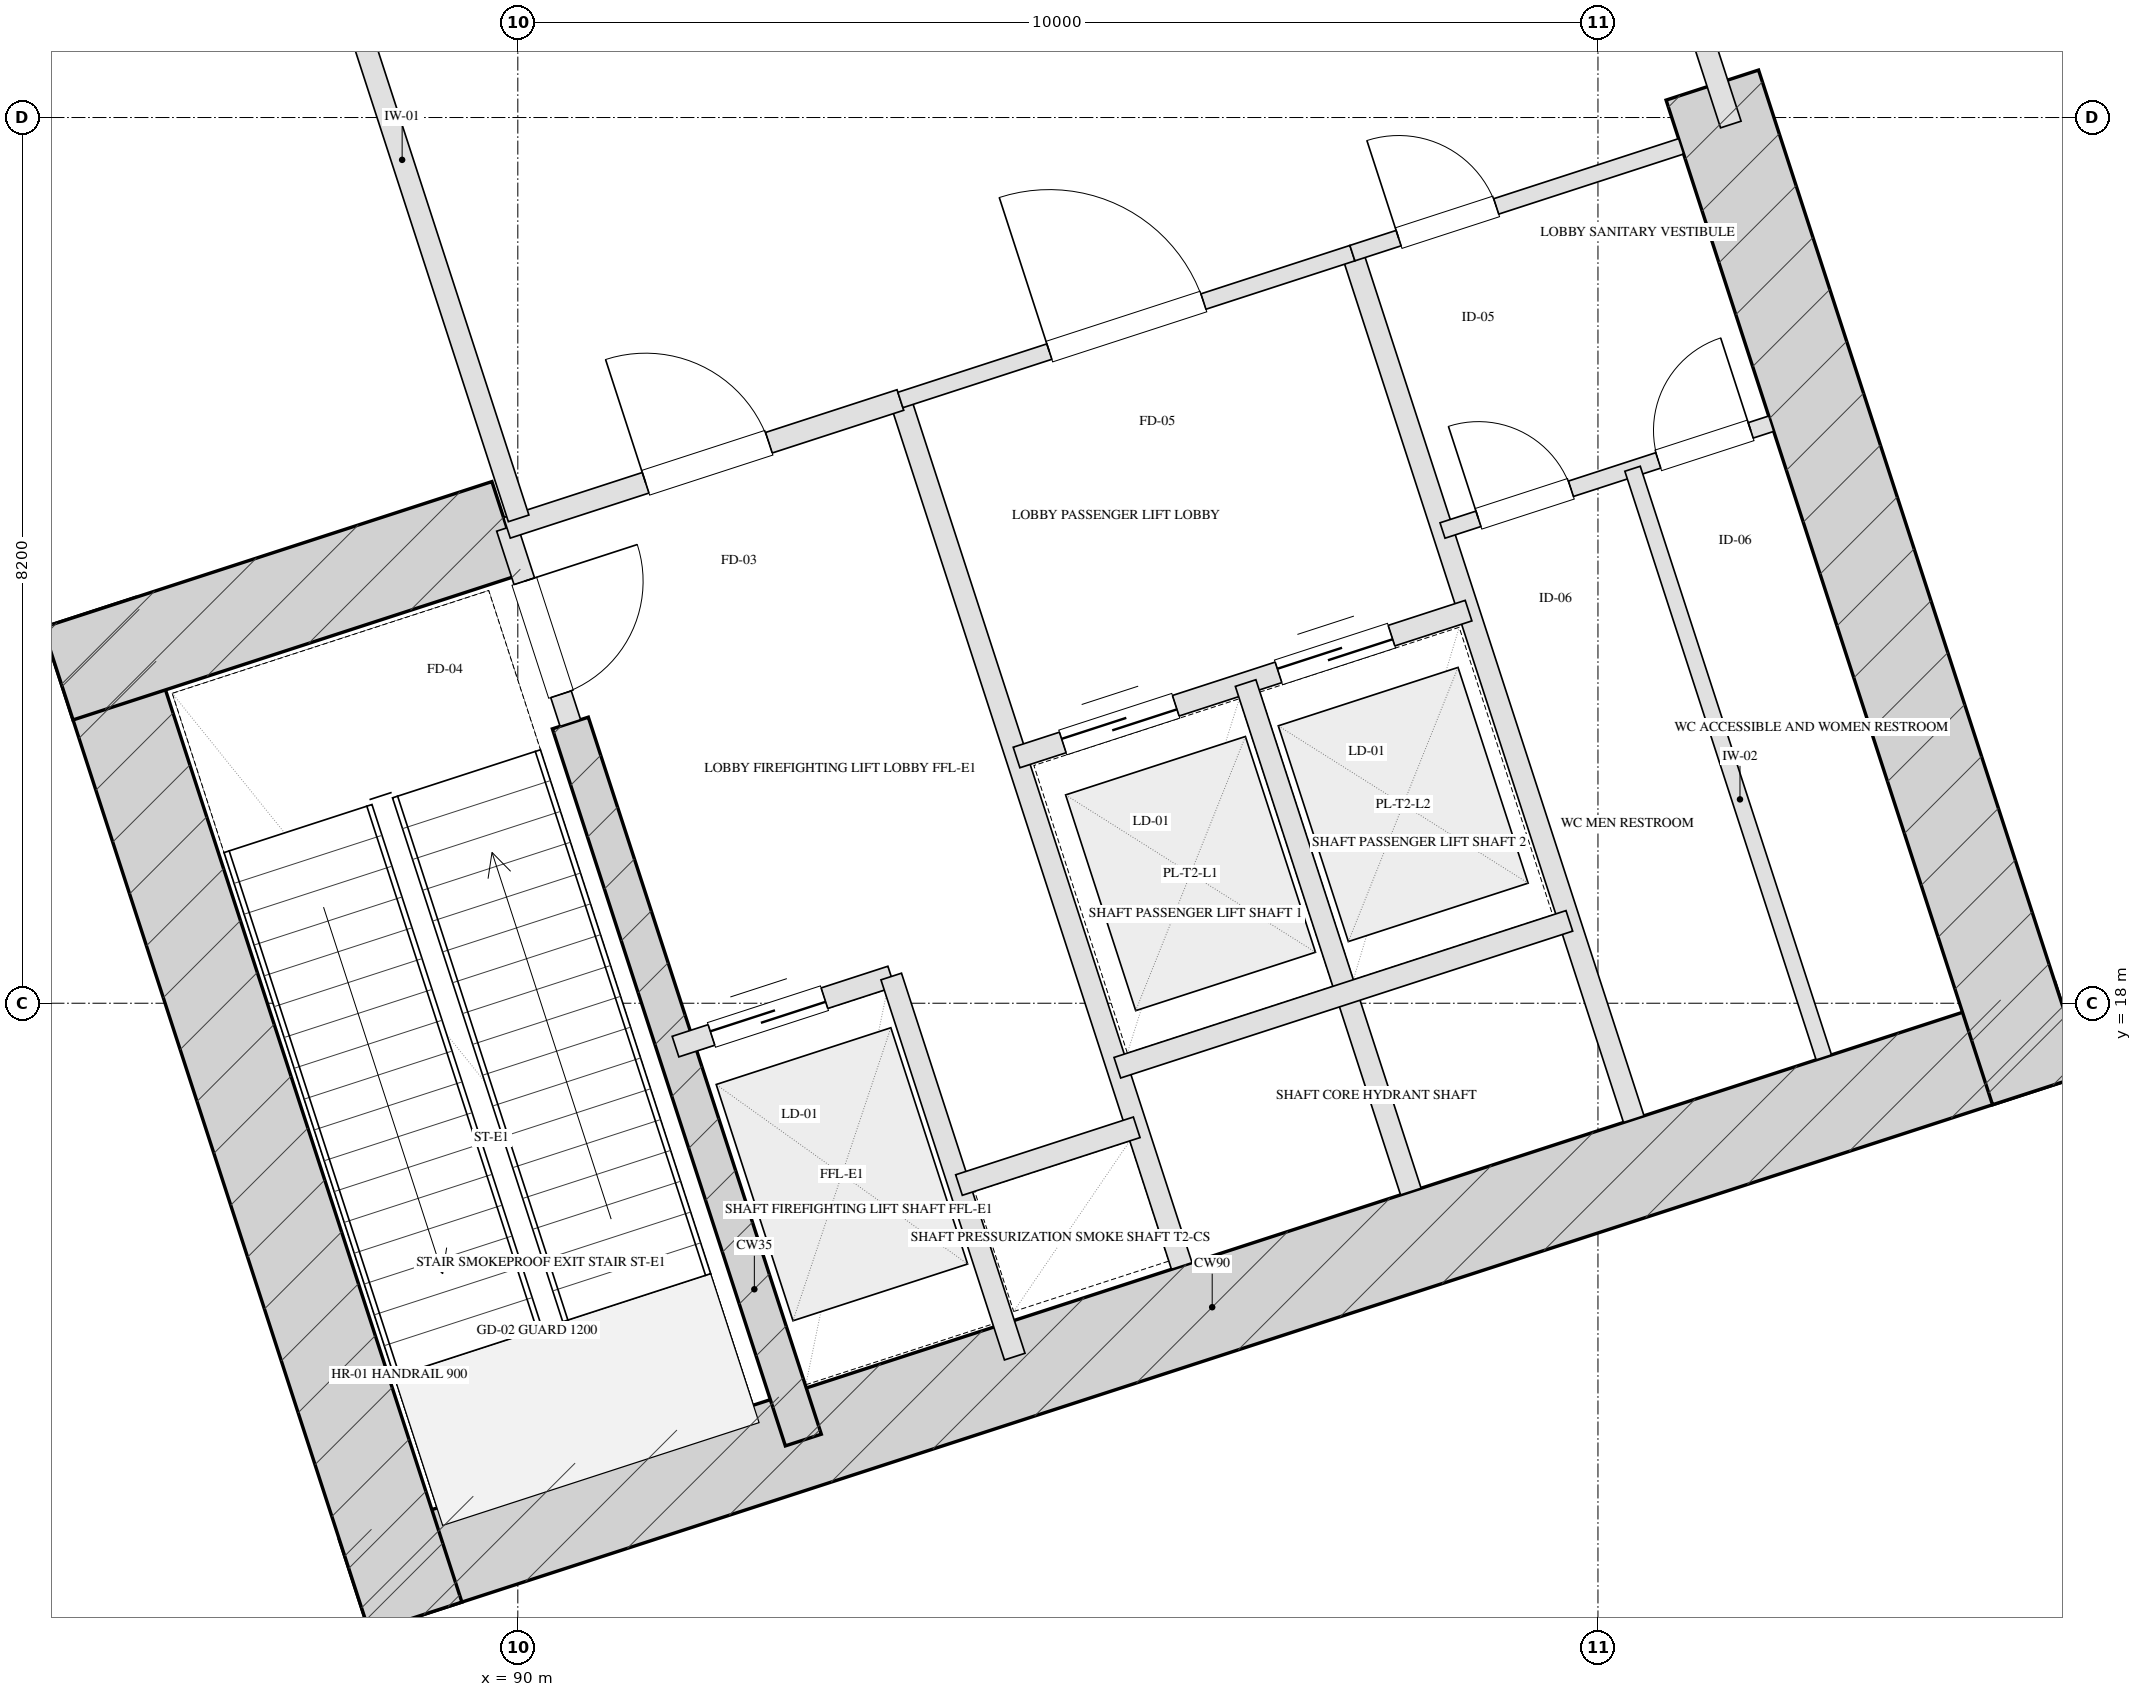
"""IFC4 building model, lengths in metres.
Left out: names, types, materials, properties, quantities, classifications, styles, units other than length and angle.
Written with IfcOpenShell. Run it as: python <this file> out.ifc"""

import sys

from ifc_helpers import new_model, si_unit, direction, frame, frame_2d, origin, place, context, subcontext, project, spatial, rectangle, extrude, element, fill, save


model = new_model("IFC4")
c1 = context("Model", 3, precision=1e-05, world=origin(), true_north=direction((0.0, 1.0)))
c2 = subcontext(c1, "Body", "Model", "MODEL_VIEW")
j1 = project(units=[si_unit("LENGTHUNIT", "METRE"), si_unit("PLANEANGLEUNIT", "RADIAN")], contexts=[c1])
p1 = place(None, origin())
s1 = spatial("IfcSite", under=j1, at=p1, CompositionType="ELEMENT")
p2 = place(p1, origin())
s2 = spatial("IfcBuilding", under=s1, at=p2, CompositionType="ELEMENT")
p3 = place(p2, origin())
s3 = spatial("IfcBuildingStorey", under=s2, at=p3, CompositionType="ELEMENT", Elevation=0.0)
p4 = place(p3, frame((88.487, 12.605, 0.0), z_axis=(0.0, 0.0, 1.0), x_axis=(0.951055016115, 0.309021611416, 0.0)))
e1 = element("IfcWall", 1, at=p4, inside=s3, PredefinedType="SHEAR", context=c2, shape_type="SweptSolid", body=[
    extrude(rectangle(XDim=16.7, YDim=0.9, at=frame_2d((8.35, 0.0))), origin(), (0.0, 0.0, 1.0), 6.0),
])
p5 = place(p3, frame((86.032, 21.618, 0.0), z_axis=(0.0, 0.0, 1.0), x_axis=(0.30901438634, -0.951057363693, 0.0)))
e2 = element("IfcWall", 2, at=p5, inside=s3, PredefinedType="SHEAR", context=c2, shape_type="SweptSolid", body=[
    extrude(rectangle(XDim=9.78, YDim=0.9, at=frame_2d((4.89, 0.0))), origin(), (0.0, 0.0, 1.0), 6.0),
])
p6 = place(p3, frame((101.059, 26.5, 0.0), z_axis=(0.0, 0.0, 1.0), x_axis=(0.309021722829, -0.951054979914, 0.0)))
e3 = element("IfcWall", 3, at=p6, inside=s3, PredefinedType="SHEAR", context=c2, shape_type="SweptSolid", body=[
    extrude(rectangle(XDim=9.78, YDim=0.9, at=frame_2d((4.89, 0.0))), origin(), (0.0, 0.0, 1.0), 6.0),
])
p7 = place(p3, frame((90.486, 20.594, 0.0), z_axis=(0.0, 0.0, 1.0), x_axis=(0.309020428229, -0.951055400562, 0.0)))
e4 = element("IfcWall", 4, at=p7, inside=s3, PredefinedType="SHEAR", context=c2, shape_type="SweptSolid", body=[
    extrude(rectangle(XDim=6.98, YDim=0.35, at=frame_2d((3.49, 0.0))), origin(), (0.0, 0.0, 1.0), 6.0),
])
p8 = place(p3, frame((85.743, 21.051, 0.0), z_axis=(0.0, 0.0, 1.0), x_axis=(0.951063623806, 0.308995118848, 0.0)))
e5 = element("IfcWall", 5, at=p8, inside=s3, PredefinedType="SHEAR", context=c2, shape_type="SweptSolid", body=[
    extrude(rectangle(XDim=4.37, YDim=0.9, at=frame_2d((2.185, 0.0))), origin(), (0.0, 0.0, 1.0), 6.0),
])
p9 = place(p3, frame((89.899, 22.401, 0.0), z_axis=(0.0, 0.0, 1.0), x_axis=(0.308932062672, -0.951084108086, 0.0)))
e6 = element("IfcWall", 6, at=p9, inside=s3, PredefinedType="PARTITIONING", context=c2, shape_type="SweptSolid", body=[
    extrude(rectangle(XDim=1.9, YDim=0.2, at=frame_2d((0.95, 0.0))), origin(), (0.0, 0.0, 1.0), 5.685),
])
p10 = place(p9, frame((0.52, 0.0, 0.0)))
e7 = element("IfcOpeningElement", 7, at=p10, cuts=e6, PredefinedType="OPENING", context=c2, shape_type="SweptSolid", body=[
    extrude(rectangle(XDim=1.1, YDim=2.05, at=frame_2d((0.55, 1.025))), frame((0.0, 0.11, 0.0), z_axis=(0.0, -1.0, 0.0), x_axis=(1.0, 0.0, 0.0)), (0.0, 0.0, 1.0), 0.22),
])
p11 = place(p3, frame((93.542, 23.585, 0.0), z_axis=(0.0, 0.0, 1.0), x_axis=(0.309042196757, -0.951048327176, 0.0)))
e8 = element("IfcWall", 8, at=p11, inside=s3, PredefinedType="PARTITIONING", context=c2, shape_type="SweptSolid", body=[
    extrude(rectangle(XDim=8.43, YDim=0.2, at=frame_2d((4.215, 0.0))), origin(), (0.0, 0.0, 1.0), 5.685),
])
p12 = place(p3, frame((89.899, 22.401, 0.0), z_axis=(0.0, 0.0, 1.0), x_axis=(0.951046716504, 0.309047153403, 0.0)))
e9 = element("IfcWall", 9, at=p12, inside=s3, PredefinedType="PARTITIONING", context=c2, shape_type="SweptSolid", body=[
    extrude(rectangle(XDim=3.83, YDim=0.2, at=frame_2d((1.915, 0.0))), origin(), (0.0, 0.0, 1.0), 5.685),
])
p13 = place(p12, frame((1.35, 0.0, 0.0)))
e10 = element("IfcOpeningElement", 10, at=p13, cuts=e9, PredefinedType="OPENING", context=c2, shape_type="SweptSolid", body=[
    extrude(rectangle(XDim=1.2, YDim=2.05, at=frame_2d((0.6, 1.025))), frame((0.0, 0.11, 0.0), z_axis=(0.0, -1.0, 0.0), x_axis=(1.0, 0.0, 0.0)), (0.0, 0.0, 1.0), 0.22),
])
p14 = place(p3, frame((91.46, 17.598, 0.0), z_axis=(0.0, 0.0, 1.0), x_axis=(0.951062257173, 0.308999325213, 0.0)))
e11 = element("IfcWall", 11, at=p14, inside=s3, PredefinedType="PARTITIONING", context=c2, shape_type="SweptSolid", body=[
    extrude(rectangle(XDim=2.1, YDim=0.2, at=frame_2d((1.05, 0.0))), origin(), (0.0, 0.0, 1.0), 5.685),
])
p15 = place(p14, frame((0.35, 0.0, 0.0)))
e12 = element("IfcOpeningElement", 12, at=p15, cuts=e11, PredefinedType="OPENING", context=c2, shape_type="SweptSolid", body=[
    extrude(rectangle(XDim=1.1, YDim=2.05, at=frame_2d((0.55, 1.025))), frame((0.0, 0.11, 0.0), z_axis=(0.0, -1.0, 0.0), x_axis=(1.0, 0.0, 0.0)), (0.0, 0.0, 1.0), 0.22),
])
p16 = place(p3, frame((93.457, 18.247, 0.0), z_axis=(0.0, 0.0, 1.0), x_axis=(0.3089935693, -0.951064127245, 0.0)))
e13 = element("IfcWall", 13, at=p16, inside=s3, PredefinedType="PARTITIONING", context=c2, shape_type="SweptSolid", body=[
    extrude(rectangle(XDim=3.7, YDim=0.2, at=frame_2d((1.85, 0.0))), origin(), (0.0, 0.0, 1.0), 5.685),
])
p17 = place(p3, frame((94.084, 16.317, 0.0), z_axis=(0.0, 0.0, 1.0), x_axis=(0.951041328149, 0.309063734775, 0.0)))
e14 = element("IfcWall", 14, at=p17, inside=s3, PredefinedType="PARTITIONING", context=c2, shape_type="SweptSolid", body=[
    extrude(rectangle(XDim=1.73, YDim=0.2, at=frame_2d((0.865, 0.0))), origin(), (0.0, 0.0, 1.0), 5.685),
])
p18 = place(p3, frame((97.727, 24.944, 0.0), z_axis=(0.0, 0.0, 1.0), x_axis=(0.309016001439, -0.951056838919, 0.0)))
e15 = element("IfcWall", 15, at=p18, inside=s3, PredefinedType="PARTITIONING", context=c2, shape_type="SweptSolid", body=[
    extrude(rectangle(XDim=8.43, YDim=0.2, at=frame_2d((4.215, 0.0))), origin(), (0.0, 0.0, 1.0), 5.685),
])
p19 = place(p3, frame((93.542, 23.585, 0.0), z_axis=(0.0, 0.0, 1.0), x_axis=(0.951063829732, 0.308994485023, 0.0)))
e16 = element("IfcWall", 16, at=p19, inside=s3, PredefinedType="PARTITIONING", context=c2, shape_type="SweptSolid", body=[
    extrude(rectangle(XDim=4.4, YDim=0.15, at=frame_2d((2.2, 0.0))), origin(), (0.0, 0.0, 1.0), 5.685),
])
p20 = place(p19, frame((1.45, 0.0, 0.0)))
e17 = element("IfcOpeningElement", 17, at=p20, cuts=e16, PredefinedType="OPENING", context=c2, shape_type="SweptSolid", body=[
    extrude(rectangle(XDim=1.5, YDim=2.05, at=frame_2d((0.75, 1.025))), frame((0.0, 0.085, 0.0), z_axis=(0.0, -1.0, 0.0), x_axis=(1.0, 0.0, 0.0)), (0.0, 0.0, 1.0), 0.17),
])
p21 = place(p3, frame((94.617, 20.275, 0.0), z_axis=(0.0, 0.0, 1.0), x_axis=(0.951058531764, 0.30901079133, 0.0)))
e18 = element("IfcWall", 18, at=p21, inside=s3, PredefinedType="PARTITIONING", context=c2, shape_type="SweptSolid", body=[
    extrude(rectangle(XDim=4.4, YDim=0.2, at=frame_2d((2.2, 0.0))), origin(), (0.0, 0.0, 1.0), 5.685),
])
p22 = place(p21, frame((0.45, 0.0, 0.0)))
e19 = element("IfcOpeningElement", 19, at=p22, cuts=e18, PredefinedType="OPENING", context=c2, shape_type="SweptSolid", body=[
    extrude(rectangle(XDim=1.1, YDim=2.05, at=frame_2d((0.55, 1.025))), frame((0.0, 0.11, 0.0), z_axis=(0.0, -1.0, 0.0), x_axis=(1.0, 0.0, 0.0)), (0.0, 0.0, 1.0), 0.22),
])
p23 = place(p21, frame((2.55, 0.0, 0.0)))
e20 = element("IfcOpeningElement", 20, at=p23, cuts=e18, PredefinedType="OPENING", context=c2, shape_type="SweptSolid", body=[
    extrude(rectangle(XDim=1.1, YDim=2.05, at=frame_2d((0.55, 1.025))), frame((0.0, 0.11, 0.0), z_axis=(0.0, -1.0, 0.0), x_axis=(1.0, 0.0, 0.0)), (0.0, 0.0, 1.0), 0.22),
])
p24 = place(p3, frame((96.738, 20.964, 0.0), z_axis=(0.0, 0.0, 1.0), x_axis=(0.309042578481, -0.951048203135, 0.0)))
e21 = element("IfcWall", 21, at=p24, inside=s3, PredefinedType="PARTITIONING", context=c2, shape_type="SweptSolid", body=[
    extrude(rectangle(XDim=4.95, YDim=0.2, at=frame_2d((2.475, 0.0))), origin(), (0.0, 0.0, 1.0), 5.685),
])
p25 = place(p3, frame((95.551, 17.403, 0.0), z_axis=(0.0, 0.0, 1.0), x_axis=(0.951058531764, 0.30901079133, 0.0)))
e22 = element("IfcWall", 22, at=p25, inside=s3, PredefinedType="PARTITIONING", context=c2, shape_type="SweptSolid", body=[
    extrude(rectangle(XDim=4.4, YDim=0.2, at=frame_2d((2.2, 0.0))), origin(), (0.0, 0.0, 1.0), 5.685),
])
p26 = place(p3, frame((97.727, 24.944, 0.0), z_axis=(0.0, 0.0, 1.0), x_axis=(0.951036872128, 0.309077446369, 0.0)))
e23 = element("IfcWall", 23, at=p26, inside=s3, PredefinedType="PARTITIONING", context=c2, shape_type="SweptSolid", body=[
    extrude(rectangle(XDim=3.2, YDim=0.15, at=frame_2d((1.6, 0.0))), origin(), (0.0, 0.0, 1.0), 5.685),
])
p27 = place(p26, frame((0.45, 0.0, 0.0)))
e24 = element("IfcOpeningElement", 24, at=p27, cuts=e23, PredefinedType="OPENING", context=c2, shape_type="SweptSolid", body=[
    extrude(rectangle(XDim=0.95, YDim=2.05, at=frame_2d((0.475, 1.025))), frame((0.0, 0.085, 0.0), z_axis=(0.0, -1.0, 0.0), x_axis=(1.0, 0.0, 0.0)), (0.0, 0.0, 1.0), 0.17),
])
p28 = place(p3, frame((98.561, 22.376, 0.0), z_axis=(0.0, 0.0, 1.0), x_axis=(0.95104415986, 0.309055020985, 0.0)))
e25 = element("IfcWall", 25, at=p28, inside=s3, PredefinedType="PARTITIONING", context=c2, shape_type="SweptSolid", body=[
    extrude(rectangle(XDim=3.2, YDim=0.15, at=frame_2d((1.6, 0.0))), origin(), (0.0, 0.0, 1.0), 5.685),
])
p29 = place(p28, frame((0.35, 0.0, 0.0)))
e26 = element("IfcOpeningElement", 26, at=p29, cuts=e25, PredefinedType="OPENING", context=c2, shape_type="SweptSolid", body=[
    extrude(rectangle(XDim=0.9, YDim=2.05, at=frame_2d((0.45, 1.025))), frame((0.0, 0.085, 0.0), z_axis=(0.0, -1.0, 0.0), x_axis=(1.0, 0.0, 0.0)), (0.0, 0.0, 1.0), 0.17),
])
p30 = place(p28, frame((2.1, 0.0, 0.0)))
e27 = element("IfcOpeningElement", 27, at=p30, cuts=e25, PredefinedType="OPENING", context=c2, shape_type="SweptSolid", body=[
    extrude(rectangle(XDim=0.9, YDim=2.05, at=frame_2d((0.45, 1.025))), frame((0.0, 0.085, 0.0), z_axis=(0.0, -1.0, 0.0), x_axis=(1.0, 0.0, 0.0)), (0.0, 0.0, 1.0), 0.17),
])
p31 = place(p3, frame((100.32, 22.948, 0.0), z_axis=(0.0, 0.0, 1.0), x_axis=(0.309035009867, -0.951050662518, 0.0)))
e28 = element("IfcWall", 28, at=p31, inside=s3, PredefinedType="PARTITIONING", context=c2, shape_type="SweptSolid", body=[
    extrude(rectangle(XDim=5.73, YDim=0.15, at=frame_2d((2.865, 0.0))), origin(), (0.0, 0.0, 1.0), 5.685),
])
p32 = place(p3, frame((90.008, 22.489, 0.0), z_axis=(0.0, 0.0, 1.0), x_axis=(-0.309023559774, 0.951054383043, 0.0)))
e29 = element("IfcWall", 29, at=p32, inside=s3, PredefinedType="PARTITIONING", context=c2, shape_type="SweptSolid", body=[
    extrude(rectangle(XDim=6.8, YDim=0.2, at=frame_2d((3.4, 0.0))), origin(), (0.0, 0.0, 1.0), 5.685),
])
p33 = place(p3, frame((101.23, 26.135, 0.0), z_axis=(0.0, 0.0, 1.0), x_axis=(-0.30903760131, 0.951049820449, 0.0)))
e30 = element("IfcWall", 30, at=p33, inside=s3, PredefinedType="PARTITIONING", context=c2, shape_type="SweptSolid", body=[
    extrude(rectangle(XDim=4.1, YDim=0.2, at=frame_2d((2.05, 0.0))), origin(), (0.0, 0.0, 1.0), 5.685),
])
p34 = place(p10, origin())
e31 = element("IfcDoor", 31, at=p34, inside=s3, OperationType="SINGLE_SWING_LEFT", PredefinedType="DOOR", context=c2, shape_type="SweptSolid", body=[
    extrude(rectangle(XDim=1.1, YDim=2.05, at=frame_2d((0.55, 1.025))), frame((0.0, 0.025, 0.0), z_axis=(0.0, -1.0, 0.0), x_axis=(1.0, 0.0, 0.0)), (0.0, 0.0, 1.0), 0.05),
])
fill(e7, e31)
p35 = place(p13, origin())
e32 = element("IfcDoor", 32, at=p35, inside=s3, OperationType="SINGLE_SWING_LEFT", PredefinedType="DOOR", context=c2, shape_type="SweptSolid", body=[
    extrude(rectangle(XDim=1.2, YDim=2.05, at=frame_2d((0.6, 1.025))), frame((0.0, 0.025, 0.0), z_axis=(0.0, -1.0, 0.0), x_axis=(1.0, 0.0, 0.0)), (0.0, 0.0, 1.0), 0.05),
])
fill(e10, e32)
p36 = place(p15, origin())
e33 = element("IfcDoor", 33, at=p36, inside=s3, OperationType="DOUBLE_DOOR_SLIDING", PredefinedType="DOOR", context=c2, shape_type="SweptSolid", body=[
    extrude(rectangle(XDim=1.1, YDim=2.05, at=frame_2d((0.55, 1.025))), frame((0.0, 0.025, 0.0), z_axis=(0.0, -1.0, 0.0), x_axis=(1.0, 0.0, 0.0)), (0.0, 0.0, 1.0), 0.05),
])
fill(e12, e33)
p37 = place(p20, origin())
e34 = element("IfcDoor", 34, at=p37, inside=s3, OperationType="SINGLE_SWING_LEFT", PredefinedType="DOOR", context=c2, shape_type="SweptSolid", body=[
    extrude(rectangle(XDim=1.5, YDim=2.05, at=frame_2d((0.75, 1.025))), frame((0.0, 0.025, 0.0), z_axis=(0.0, -1.0, 0.0), x_axis=(1.0, 0.0, 0.0)), (0.0, 0.0, 1.0), 0.05),
])
fill(e17, e34)
p38 = place(p22, origin())
e35 = element("IfcDoor", 35, at=p38, inside=s3, OperationType="DOUBLE_DOOR_SLIDING", PredefinedType="DOOR", context=c2, shape_type="SweptSolid", body=[
    extrude(rectangle(XDim=1.1, YDim=2.05, at=frame_2d((0.55, 1.025))), frame((0.0, 0.025, 0.0), z_axis=(0.0, -1.0, 0.0), x_axis=(1.0, 0.0, 0.0)), (0.0, 0.0, 1.0), 0.05),
])
fill(e19, e35)
p39 = place(p23, origin())
e36 = element("IfcDoor", 36, at=p39, inside=s3, OperationType="DOUBLE_DOOR_SLIDING", PredefinedType="DOOR", context=c2, shape_type="SweptSolid", body=[
    extrude(rectangle(XDim=1.1, YDim=2.05, at=frame_2d((0.55, 1.025))), frame((0.0, 0.025, 0.0), z_axis=(0.0, -1.0, 0.0), x_axis=(1.0, 0.0, 0.0)), (0.0, 0.0, 1.0), 0.05),
])
fill(e20, e36)
p40 = place(p27, origin())
e37 = element("IfcDoor", 37, at=p40, inside=s3, OperationType="SINGLE_SWING_LEFT", PredefinedType="DOOR", context=c2, shape_type="SweptSolid", body=[
    extrude(rectangle(XDim=0.95, YDim=2.05, at=frame_2d((0.475, 1.025))), frame((0.0, 0.025, 0.0), z_axis=(0.0, -1.0, 0.0), x_axis=(1.0, 0.0, 0.0)), (0.0, 0.0, 1.0), 0.05),
])
fill(e24, e37)
p41 = place(p29, origin())
e38 = element("IfcDoor", 38, at=p41, inside=s3, OperationType="SINGLE_SWING_LEFT", PredefinedType="DOOR", context=c2, shape_type="SweptSolid", body=[
    extrude(rectangle(XDim=0.9, YDim=2.05, at=frame_2d((0.45, 1.025))), frame((0.0, 0.025, 0.0), z_axis=(0.0, -1.0, 0.0), x_axis=(1.0, 0.0, 0.0)), (0.0, 0.0, 1.0), 0.05),
])
fill(e26, e38)
p42 = place(p30, origin())
e39 = element("IfcDoor", 39, at=p42, inside=s3, OperationType="SINGLE_SWING_RIGHT", PredefinedType="DOOR", context=c2, shape_type="SweptSolid", body=[
    extrude(rectangle(XDim=0.9, YDim=2.05, at=frame_2d((0.45, 1.025))), frame((0.0, 0.025, 0.0), z_axis=(0.0, -1.0, 0.0), x_axis=(1.0, 0.0, 0.0)), (0.0, 0.0, 1.0), 0.05),
])
fill(e27, e39)
save(model, sys.argv[1])
